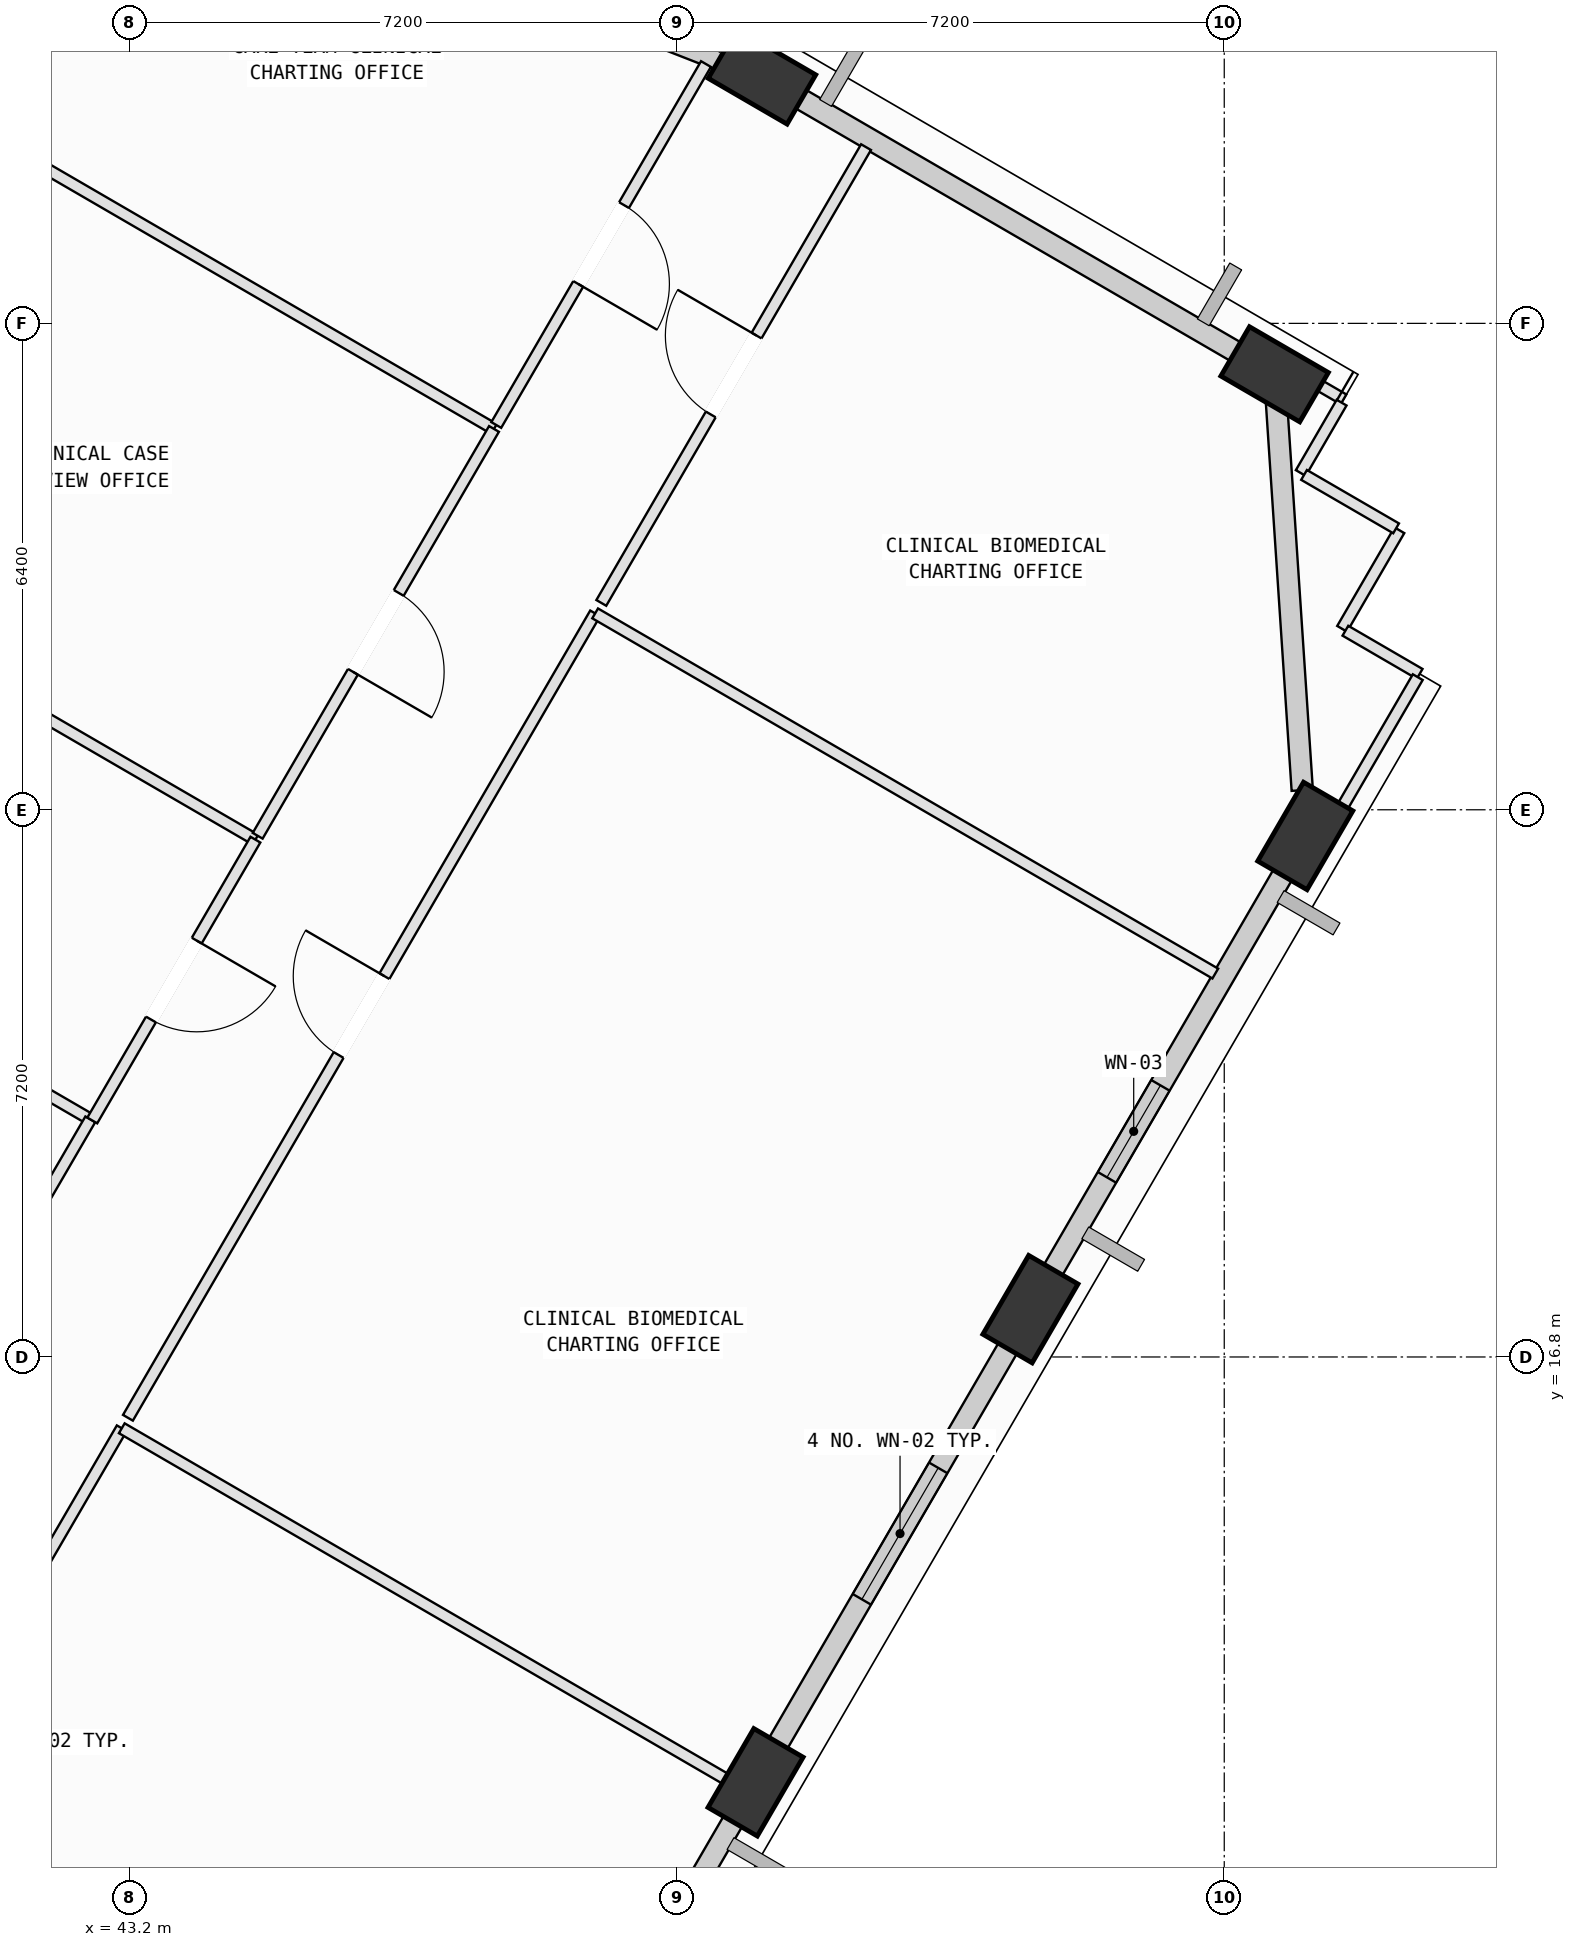
"""IFC4 building model, lengths in metres.
Left out: names, types, materials, properties, quantities, classifications, styles, units other than length and angle.
Written with IfcOpenShell. Run it as: python <this file> out.ifc"""

import sys

from ifc_helpers import new_model, si_unit, direction, frame, frame_2d, origin, origin_2d, place, context, subcontext, project, spatial, rectangle, extrude, element, fill, save


model = new_model("IFC4")
c1 = context("Model", 3, precision=1e-05, world=origin(), true_north=direction((0.0, 1.0)))
c2 = subcontext(c1, "Body", "Model", "MODEL_VIEW")
j1 = project(units=[si_unit("LENGTHUNIT", "METRE"), si_unit("PLANEANGLEUNIT", "RADIAN")], contexts=[c1])
p1 = place(None, origin())
s1 = spatial("IfcSite", under=j1, at=p1, CompositionType="ELEMENT")
p2 = place(p1, origin())
s2 = spatial("IfcBuilding", under=s1, at=p2, CompositionType="ELEMENT")
p3 = place(p2, frame((0.0, 0.0, 280.6)))
s3 = spatial("IfcBuildingStorey", under=s2, at=p3, CompositionType="ELEMENT", Elevation=280.6)
p4 = place(p3, frame((51.434, 11.204, 0.002), z_axis=(0.055536798453, 0.074028788299, 0.995708492743), x_axis=(-0.918464860878, -0.387321957241, 0.080025000913)))
e1 = element("IfcColumn", 1, at=p4, inside=s3, PredefinedType="COLUMN", context=c2, shape_type="SweptSolid", body=[
    extrude(rectangle(XDim=1.2, YDim=0.75, at=origin_2d()), origin(), (0.0, 0.0, 1.0), 4.014),
])
p5 = place(p3, frame((55.05, 17.429, 0.002), z_axis=(0.029681485229, 0.088801164824, 0.995607032197), x_axis=(-0.749276423708, -0.657289714585, 0.08096339899)))
e2 = element("IfcColumn", 2, at=p5, inside=s3, PredefinedType="COLUMN", context=c2, shape_type="SweptSolid", body=[
    extrude(rectangle(XDim=1.2, YDim=0.75, at=origin_2d()), origin(), (0.0, 0.0, 1.0), 4.014),
])
p6 = place(p3, frame((58.666, 23.656, 0.002), z_axis=(0.003828096873, 0.103358615571, 0.994636789115), x_axis=(-0.533754231282, -0.840896823689, 0.089436863197)))
e3 = element("IfcColumn", 3, at=p6, inside=s3, PredefinedType="COLUMN", context=c2, shape_type="SweptSolid", body=[
    extrude(rectangle(XDim=1.2, YDim=0.75, at=origin_2d()), origin(), (0.0, 0.0, 1.0), 4.018),
])
p7 = place(p3, frame((58.262, 29.73, 0.002), z_axis=(-0.021145184789, 0.101472582177, 0.994613591415), x_axis=(0.948439893155, -0.312652238983, 0.052060988571)))
e4 = element("IfcColumn", 4, at=p7, inside=s3, PredefinedType="COLUMN", context=c2, shape_type="SweptSolid", body=[
    extrude(rectangle(XDim=1.2, YDim=0.75, at=origin_2d()), origin(), (0.0, 0.0, 1.0), 4.018),
])
p8 = place(p3, frame((51.518, 33.647, 0.002), z_axis=(-0.037199158282, 0.07372860995, 0.996584323927), x_axis=(0.997490610235, -0.057376614937, 0.041477783832)))
e5 = element("IfcColumn", 5, at=p8, inside=s3, PredefinedType="COLUMN", context=c2, shape_type="SweptSolid", body=[
    extrude(rectangle(XDim=1.2, YDim=0.75, at=origin_2d()), origin(), (0.0, 0.0, 1.0), 4.01),
])
p9 = place(p3, frame((51.327, 11.02, 0.0), z_axis=(0.0, 0.0, 1.0), x_axis=(-0.502267756703, -0.86471214897, 0.0)))
e6 = element("IfcWall", 6, at=p9, inside=s3, PredefinedType="SOLIDWALL", context=c2, shape_type="SweptSolid", body=[
    extrude(rectangle(XDim=6.413, YDim=0.28, at=frame_2d((3.207, 0.0))), origin(), (0.0, 0.0, 1.0), 3.265),
])
p10 = place(p9, frame((2.405, 0.0, 0.75)))
e7 = element("IfcOpeningElement", 7, at=p10, cuts=e6, PredefinedType="OPENING", context=c2, shape_type="SweptSolid", body=[
    extrude(rectangle(XDim=1.6, YDim=1.95, at=frame_2d((0.8, 0.975))), frame((0.0, 0.15, 0.0), z_axis=(0.0, -1.0, 0.0), x_axis=(1.0, 0.0, 0.0)), (0.0, 0.0, 1.0), 0.3),
])
p11 = place(p3, frame((54.944, 17.246, 0.0), z_axis=(0.0, 0.0, 1.0), x_axis=(-0.50227800112, -0.864706198423, 0.0)))
e8 = element("IfcWall", 8, at=p11, inside=s3, PredefinedType="SOLIDWALL", context=c2, shape_type="SweptSolid", body=[
    extrude(rectangle(XDim=6.407, YDim=0.28, at=frame_2d((3.203, 0.0))), origin(), (0.0, 0.0, 1.0), 3.265),
])
p12 = place(p11, frame((2.204, 0.0, 0.75)))
e9 = element("IfcOpeningElement", 9, at=p12, cuts=e8, PredefinedType="OPENING", context=c2, shape_type="SweptSolid", body=[
    extrude(rectangle(XDim=2.0, YDim=1.95, at=frame_2d((1.0, 0.975))), frame((0.0, 0.15, 0.0), z_axis=(0.0, -1.0, 0.0), x_axis=(1.0, 0.0, 0.0)), (0.0, 0.0, 1.0), 0.3),
])
p13 = place(p3, frame((58.565, 23.481, 0.0), z_axis=(0.0, 0.0, 1.0), x_axis=(-0.502254807132, -0.864719670594, 0.0)))
e10 = element("IfcWall", 10, at=p13, inside=s3, PredefinedType="SOLIDWALL", context=c2, shape_type="SweptSolid", body=[
    extrude(rectangle(XDim=6.418, YDim=0.28, at=frame_2d((3.209, 0.0))), origin(), (0.0, 0.0, 1.0), 3.265),
])
p14 = place(p13, frame((3.593, 0.0, 0.75)))
e11 = element("IfcOpeningElement", 11, at=p14, cuts=e10, PredefinedType="OPENING", context=c2, shape_type="SweptSolid", body=[
    extrude(rectangle(XDim=1.4, YDim=1.85, at=frame_2d((0.7, 0.925))), frame((0.0, 0.15, 0.0), z_axis=(0.0, -1.0, 0.0), x_axis=(1.0, 0.0, 0.0)), (0.0, 0.0, 1.0), 0.3),
])
p15 = place(p3, frame((58.275, 29.54, 0.0), z_axis=(0.0, 0.0, 1.0), x_axis=(0.066313938445, -0.997798808161, 0.0)))
e12 = element("IfcWall", 12, at=p15, inside=s3, PredefinedType="SOLIDWALL", context=c2, shape_type="SweptSolid", body=[
    extrude(rectangle(XDim=5.294, YDim=0.28, at=frame_2d((2.647, 0.0))), origin(), (0.0, 0.0, 1.0), 3.265),
])
p16 = place(p3, frame((51.732, 33.523, 0.0), z_axis=(0.0, 0.0, 1.0), x_axis=(0.864724875951, -0.502245845091, 0.0)))
e13 = element("IfcWall", 13, at=p16, inside=s3, PredefinedType="SOLIDWALL", context=c2, shape_type="SweptSolid", body=[
    extrude(rectangle(XDim=7.046, YDim=0.28, at=frame_2d((3.523, 0.0))), origin(), (0.0, 0.0, 1.0), 3.265),
])
p17 = place(p3, frame((42.632, 37.123, 0.0), z_axis=(0.0, 0.0, 1.0), x_axis=(0.931312918813, -0.364220053335, 0.0)))
e14 = element("IfcWall", 14, at=p17, inside=s3, PredefinedType="SOLIDWALL", context=c2, shape_type="SweptSolid", body=[
    extrude(rectangle(XDim=9.036, YDim=0.28, at=frame_2d((4.518, 0.0))), origin(), (0.0, 0.0, 1.0), 3.265),
])
p18 = place(p3, frame((38.787, 31.042, 0.0), z_axis=(0.0, 0.0, 1.0), x_axis=(0.502269295317, 0.864711255265, 0.0)))
e15 = element("IfcWall", 15, at=p18, inside=s3, PredefinedType="SOLIDWALL", context=c2, shape_type="SweptSolid", body=[
    extrude(rectangle(XDim=6.78, YDim=0.28, at=frame_2d((3.39, 0.0))), origin(), (0.0, 0.0, 1.0), 3.265),
])
p19 = place(p18, frame((3.953, 0.0, 0.75)))
e16 = element("IfcOpeningElement", 16, at=p19, cuts=e15, PredefinedType="OPENING", context=c2, shape_type="SweptSolid", body=[
    extrude(rectangle(XDim=2.0, YDim=1.95, at=frame_2d((1.0, 0.975))), frame((0.0, 0.15, 0.0), z_axis=(0.0, -1.0, 0.0), x_axis=(1.0, 0.0, 0.0)), (0.0, 0.0, 1.0), 0.3),
])
p20 = place(p3, frame((39.48, 9.638, 0.0), z_axis=(0.0, 0.0, 1.0), x_axis=(0.502237798626, 0.864729549415, 0.0)))
e17 = element("IfcWall", 17, at=p20, inside=s3, PredefinedType="PARTITIONING", context=c2, shape_type="SweptSolid", body=[
    extrude(rectangle(XDim=7.198, YDim=0.15, at=frame_2d((3.599, 0.0))), origin(), (0.0, 0.0, 1.0), 3.78),
])
p21 = place(p20, frame((2.999, 0.0, 0.0)))
e18 = element("IfcOpeningElement", 18, at=p21, cuts=e17, PredefinedType="OPENING", context=c2, shape_type="SweptSolid", body=[
    extrude(rectangle(XDim=1.2, YDim=2.15, at=frame_2d((0.6, 1.075))), frame((0.0, 0.085, 0.0), z_axis=(0.0, -1.0, 0.0), x_axis=(1.0, 0.0, 0.0)), (0.0, 0.0, 1.0), 0.17),
])
p22 = place(p3, frame((43.095, 15.862, 0.0), z_axis=(0.0, 0.0, 1.0), x_axis=(0.864729577588, -0.502237750119, 0.0)))
e19 = element("IfcWall", 19, at=p22, inside=s3, PredefinedType="PARTITIONING", context=c2, shape_type="SweptSolid", body=[
    extrude(rectangle(XDim=9.448, YDim=0.15, at=frame_2d((4.724, 0.0))), origin(), (0.0, 0.0, 1.0), 3.78),
])
p23 = place(p3, frame((43.176, 16.0, 0.0), z_axis=(0.0, 0.0, 1.0), x_axis=(0.502223094905, 0.864738089218, 0.0)))
e20 = element("IfcWall", 20, at=p23, inside=s3, PredefinedType="PARTITIONING", context=c2, shape_type="SweptSolid", body=[
    extrude(rectangle(XDim=12.24, YDim=0.15, at=frame_2d((6.12, 0.0))), origin(), (0.0, 0.0, 1.0), 3.415),
])
p24 = place(p23, frame((5.52, 0.0, 0.0)))
e21 = element("IfcOpeningElement", 21, at=p24, cuts=e20, PredefinedType="OPENING", context=c2, shape_type="SweptSolid", body=[
    extrude(rectangle(XDim=1.2, YDim=2.15, at=frame_2d((0.6, 1.075))), frame((0.0, 0.085, 0.0), z_axis=(0.0, -1.0, 0.0), x_axis=(1.0, 0.0, 0.0)), (0.0, 0.0, 1.0), 0.17),
])
p25 = place(p3, frame((49.323, 26.584, 0.0), z_axis=(0.0, 0.0, 1.0), x_axis=(0.864716809852, -0.502259732369, 0.0)))
e22 = element("IfcWall", 22, at=p25, inside=s3, PredefinedType="PARTITIONING", context=c2, shape_type="SweptSolid", body=[
    extrude(rectangle(XDim=9.435, YDim=0.15, at=frame_2d((4.718, 0.0))), origin(), (0.0, 0.0, 1.0), 3.78),
])
p26 = place(p3, frame((55.54, 17.815, 0.0), z_axis=(0.0, 0.0, 1.0), x_axis=(-0.502969023227, -0.864304438074, 0.0)))
e23 = element("IfcWall", 23, at=p26, inside=s3, PredefinedType="PARTITIONING", context=c2, shape_type="SweptSolid", body=[
    extrude(rectangle(XDim=0.791, YDim=0.15, at=frame_2d((0.396, 0.0))), origin(), (0.0, 0.0, 1.0), 3.265),
])
p27 = place(p3, frame((51.924, 11.591, 0.0), z_axis=(0.0, 0.0, 1.0), x_axis=(-0.501912770939, -0.864918244904, 0.0)))
e24 = element("IfcWall", 24, at=p27, inside=s3, PredefinedType="PARTITIONING", context=c2, shape_type="SweptSolid", body=[
    extrude(rectangle(XDim=0.582, YDim=0.15, at=frame_2d((0.291, 0.0))), origin(), (0.0, 0.0, 1.0), 3.265),
])
p28 = place(p3, frame((59.904, 27.678, 0.0), z_axis=(0.0, 0.0, 1.0), x_axis=(-0.502210133322, -0.864745616923, 0.0)))
e25 = element("IfcWall", 25, at=p28, inside=s3, PredefinedType="PARTITIONING", context=c2, shape_type="SweptSolid", body=[
    extrude(rectangle(XDim=1.5, YDim=0.15, at=frame_2d((0.75, 0.0))), origin(), (0.0, 0.0, 1.0), 3.78),
])
p29 = place(p3, frame((59.194, 26.356, 0.0), z_axis=(0.0, 0.0, 1.0), x_axis=(0.864522470603, -0.502594168114, 0.0)))
e26 = element("IfcWall", 26, at=p29, inside=s3, PredefinedType="PARTITIONING", context=c2, shape_type="SweptSolid", body=[
    extrude(rectangle(XDim=1.13, YDim=0.15, at=frame_2d((0.565, 0.0))), origin(), (0.0, 0.0, 1.0), 3.78),
])
p30 = place(p3, frame((60.146, 25.745, 0.0), z_axis=(0.0, 0.0, 1.0), x_axis=(-0.502154776785, -0.864777763447, 0.0)))
e27 = element("IfcWall", 27, at=p30, inside=s3, PredefinedType="PARTITIONING", context=c2, shape_type="SweptSolid", body=[
    extrude(rectangle(XDim=2.752, YDim=0.15, at=frame_2d((1.376, 0.0))), origin(), (0.0, 0.0, 1.0), 3.265),
])
p31 = place(p3, frame((49.404, 26.722, 0.0), z_axis=(0.0, 0.0, 1.0), x_axis=(0.502215346727, 0.864742589163, 0.0)))
e28 = element("IfcWall", 28, at=p31, inside=s3, PredefinedType="PARTITIONING", context=c2, shape_type="SweptSolid", body=[
    extrude(rectangle(XDim=6.935, YDim=0.15, at=frame_2d((3.468, 0.0))), origin(), (0.0, 0.0, 1.0), 3.78),
])
p32 = place(p31, frame((2.867, 0.0, 0.0)))
e29 = element("IfcOpeningElement", 29, at=p32, cuts=e28, PredefinedType="OPENING", context=c2, shape_type="SweptSolid", body=[
    extrude(rectangle(XDim=1.2, YDim=2.15, at=frame_2d((0.6, 1.075))), frame((0.0, 0.085, 0.0), z_axis=(0.0, -1.0, 0.0), x_axis=(1.0, 0.0, 0.0)), (0.0, 0.0, 1.0), 0.17),
])
p33 = place(p3, frame((57.911, 30.131, 0.0), z_axis=(0.0, 0.0, 1.0), x_axis=(0.86457499648, -0.502503806415, 0.0)))
e30 = element("IfcWall", 30, at=p33, inside=s3, PredefinedType="PARTITIONING", context=c2, shape_type="SweptSolid", body=[
    extrude(rectangle(XDim=1.455, YDim=0.15, at=frame_2d((0.728, 0.0))), origin(), (0.0, 0.0, 1.0), 3.265),
])
p34 = place(p3, frame((59.144, 29.357, 0.0), z_axis=(0.0, 0.0, 1.0), x_axis=(-0.501728328812, -0.865025250538, 0.0)))
e31 = element("IfcWall", 31, at=p34, inside=s3, PredefinedType="PARTITIONING", context=c2, shape_type="SweptSolid", body=[
    extrude(rectangle(XDim=1.071, YDim=0.15, at=frame_2d((0.535, 0.0))), origin(), (0.0, 0.0, 1.0), 3.78),
])
p35 = place(p3, frame((58.65, 28.406, 0.0), z_axis=(0.0, 0.0, 1.0), x_axis=(0.86483289795, -0.502059815782, 0.0)))
e32 = element("IfcWall", 32, at=p35, inside=s3, PredefinedType="PARTITIONING", context=c2, shape_type="SweptSolid", body=[
    extrude(rectangle(XDim=1.4, YDim=0.15, at=frame_2d((0.7, 0.0))), origin(), (0.0, 0.0, 1.0), 3.78),
])
p36 = place(p3, frame((34.466, 24.698, 0.0), z_axis=(0.0, 0.0, 1.0), x_axis=(0.864739263201, -0.50222107351, 0.0)))
e33 = element("IfcWall", 33, at=p36, inside=s3, PredefinedType="PARTITIONING", context=c2, shape_type="SweptSolid", body=[
    extrude(rectangle(XDim=9.5, YDim=0.15, at=frame_2d((4.75, 0.0))), origin(), (0.0, 0.0, 1.0), 3.78),
])
p37 = place(p3, frame((42.681, 19.927, 0.0), z_axis=(0.0, 0.0, 1.0), x_axis=(-0.502252880546, -0.86472078961, 0.0)))
e34 = element("IfcWall", 34, at=p37, inside=s3, PredefinedType="PARTITIONING", context=c2, shape_type="SweptSolid", body=[
    extrude(rectangle(XDim=6.373, YDim=0.15, at=frame_2d((3.187, 0.0))), origin(), (0.0, 0.0, 1.0), 3.78),
])
p38 = place(p3, frame((37.187, 28.059, 0.0), z_axis=(0.0, 0.0, 1.0), x_axis=(0.864744193966, -0.502212583477, 0.0)))
e35 = element("IfcWall", 35, at=p38, inside=s3, PredefinedType="PARTITIONING", context=c2, shape_type="SweptSolid", body=[
    extrude(rectangle(XDim=8.865, YDim=0.15, at=frame_2d((4.433, 0.0))), origin(), (0.0, 0.0, 1.0), 3.78),
])
p39 = place(p3, frame((44.853, 23.607, 0.0), z_axis=(0.0, 0.0, 1.0), x_axis=(-0.502243030772, -0.864726510546, 0.0)))
e36 = element("IfcWall", 36, at=p39, inside=s3, PredefinedType="PARTITIONING", context=c2, shape_type="SweptSolid", body=[
    extrude(rectangle(XDim=4.273, YDim=0.15, at=frame_2d((2.136, 0.0))), origin(), (0.0, 0.0, 1.0), 3.78),
])
p40 = place(p39, frame((1.537, 0.0, 0.0)))
e37 = element("IfcOpeningElement", 37, at=p40, cuts=e36, PredefinedType="OPENING", context=c2, shape_type="SweptSolid", body=[
    extrude(rectangle(XDim=1.2, YDim=2.15, at=frame_2d((0.6, 1.075))), frame((0.0, 0.085, 0.0), z_axis=(0.0, -1.0, 0.0), x_axis=(1.0, 0.0, 0.0)), (0.0, 0.0, 1.0), 0.17),
])
p41 = place(p3, frame((40.327, 33.464, 0.0), z_axis=(0.0, 0.0, 1.0), x_axis=(0.864668557015, -0.502342797807, 0.0)))
e38 = element("IfcWall", 38, at=p41, inside=s3, PredefinedType="PARTITIONING", context=c2, shape_type="SweptSolid", body=[
    extrude(rectangle(XDim=8.865, YDim=0.15, at=frame_2d((4.432, 0.0))), origin(), (0.0, 0.0, 1.0), 3.78),
])
p42 = place(p3, frame((47.992, 29.011, 0.0), z_axis=(0.0, 0.0, 1.0), x_axis=(-0.502217339736, -0.864741431683, 0.0)))
e39 = element("IfcWall", 39, at=p42, inside=s3, PredefinedType="PARTITIONING", context=c2, shape_type="SweptSolid", body=[
    extrude(rectangle(XDim=6.19, YDim=0.15, at=frame_2d((3.095, 0.0))), origin(), (0.0, 0.0, 1.0), 3.78),
])
p43 = place(p42, frame((2.495, 0.0, 0.0)))
e40 = element("IfcOpeningElement", 40, at=p43, cuts=e39, PredefinedType="OPENING", context=c2, shape_type="SweptSolid", body=[
    extrude(rectangle(XDim=1.2, YDim=2.15, at=frame_2d((0.6, 1.075))), frame((0.0, 0.085, 0.0), z_axis=(0.0, -1.0, 0.0), x_axis=(1.0, 0.0, 0.0)), (0.0, 0.0, 1.0), 0.17),
])
p44 = place(p3, frame((39.782, 33.85, 0.0), z_axis=(0.0, 0.0, 1.0), x_axis=(0.50220220608, 0.864750220704, 0.0)))
e41 = element("IfcWall", 41, at=p44, inside=s3, PredefinedType="PARTITIONING", context=c2, shape_type="SweptSolid", body=[
    extrude(rectangle(XDim=4.769, YDim=0.15, at=frame_2d((2.385, 0.0))), origin(), (0.0, 0.0, 1.0), 3.265),
])
p45 = place(p3, frame((50.781, 33.812, 0.0), z_axis=(0.0, 0.0, 1.0), x_axis=(-0.502344614272, -0.864667501709, 0.0)))
e42 = element("IfcWall", 42, at=p45, inside=s3, PredefinedType="PARTITIONING", context=c2, shape_type="SweptSolid", body=[
    extrude(rectangle(XDim=5.492, YDim=0.15, at=frame_2d((2.746, 0.0))), origin(), (0.0, 0.0, 1.0), 3.78),
])
p46 = place(p45, frame((2.146, 0.0, 0.0)))
e43 = element("IfcOpeningElement", 43, at=p46, cuts=e42, PredefinedType="OPENING", context=c2, shape_type="SweptSolid", body=[
    extrude(rectangle(XDim=1.2, YDim=2.15, at=frame_2d((0.6, 1.075))), frame((0.0, 0.085, 0.0), z_axis=(0.0, -1.0, 0.0), x_axis=(1.0, 0.0, 0.0)), (0.0, 0.0, 1.0), 0.17),
])
p47 = place(p12, origin())
e44 = element("IfcWindow", 44, at=p47, inside=s3, PartitioningType="SINGLE_PANEL", PredefinedType="WINDOW", context=c2, shape_type="SweptSolid", body=[
    extrude(rectangle(XDim=2.0, YDim=1.95, at=frame_2d((1.0, 0.975))), frame((0.0, 0.03, 0.0), z_axis=(0.0, -1.0, 0.0), x_axis=(1.0, 0.0, 0.0)), (0.0, 0.0, 1.0), 0.06),
])
fill(e9, e44)
p48 = place(p14, origin())
e45 = element("IfcWindow", 45, at=p48, inside=s3, PartitioningType="SINGLE_PANEL", PredefinedType="WINDOW", context=c2, shape_type="SweptSolid", body=[
    extrude(rectangle(XDim=1.4, YDim=1.85, at=frame_2d((0.7, 0.925))), frame((0.0, 0.03, 0.0), z_axis=(0.0, -1.0, 0.0), x_axis=(1.0, 0.0, 0.0)), (0.0, 0.0, 1.0), 0.06),
])
fill(e11, e45)
p49 = place(p24, origin())
e46 = element("IfcDoor", 46, at=p49, inside=s3, OperationType="SINGLE_SWING_RIGHT", PredefinedType="DOOR", context=c2, shape_type="SweptSolid", body=[
    extrude(rectangle(XDim=1.2, YDim=2.15, at=frame_2d((0.6, 1.075))), frame((0.0, 0.025, 0.0), z_axis=(0.0, -1.0, 0.0), x_axis=(1.0, 0.0, 0.0)), (0.0, 0.0, 1.0), 0.05),
])
fill(e21, e46)
p50 = place(p32, origin())
e47 = element("IfcDoor", 47, at=p50, inside=s3, OperationType="SINGLE_SWING_RIGHT", PredefinedType="DOOR", context=c2, shape_type="SweptSolid", body=[
    extrude(rectangle(XDim=1.2, YDim=2.15, at=frame_2d((0.6, 1.075))), frame((0.0, 0.025, 0.0), z_axis=(0.0, -1.0, 0.0), x_axis=(1.0, 0.0, 0.0)), (0.0, 0.0, 1.0), 0.05),
])
fill(e29, e47)
p51 = place(p40, origin())
e48 = element("IfcDoor", 48, at=p51, inside=s3, OperationType="SINGLE_SWING_LEFT", PredefinedType="DOOR", context=c2, shape_type="SweptSolid", body=[
    extrude(rectangle(XDim=1.2, YDim=2.15, at=frame_2d((0.6, 1.075))), frame((0.0, 0.025, 0.0), z_axis=(0.0, -1.0, 0.0), x_axis=(1.0, 0.0, 0.0)), (0.0, 0.0, 1.0), 0.05),
])
fill(e37, e48)
p52 = place(p43, origin())
e49 = element("IfcDoor", 49, at=p52, inside=s3, OperationType="SINGLE_SWING_RIGHT", PredefinedType="DOOR", context=c2, shape_type="SweptSolid", body=[
    extrude(rectangle(XDim=1.2, YDim=2.15, at=frame_2d((0.6, 1.075))), frame((0.0, 0.025, 0.0), z_axis=(0.0, -1.0, 0.0), x_axis=(1.0, 0.0, 0.0)), (0.0, 0.0, 1.0), 0.05),
])
fill(e40, e49)
p53 = place(p46, origin())
e50 = element("IfcDoor", 50, at=p53, inside=s3, OperationType="SINGLE_SWING_RIGHT", PredefinedType="DOOR", context=c2, shape_type="SweptSolid", body=[
    extrude(rectangle(XDim=1.2, YDim=2.15, at=frame_2d((0.6, 1.075))), frame((0.0, 0.025, 0.0), z_axis=(0.0, -1.0, 0.0), x_axis=(1.0, 0.0, 0.0)), (0.0, 0.0, 1.0), 0.05),
])
fill(e43, e50)
save(model, sys.argv[1])
